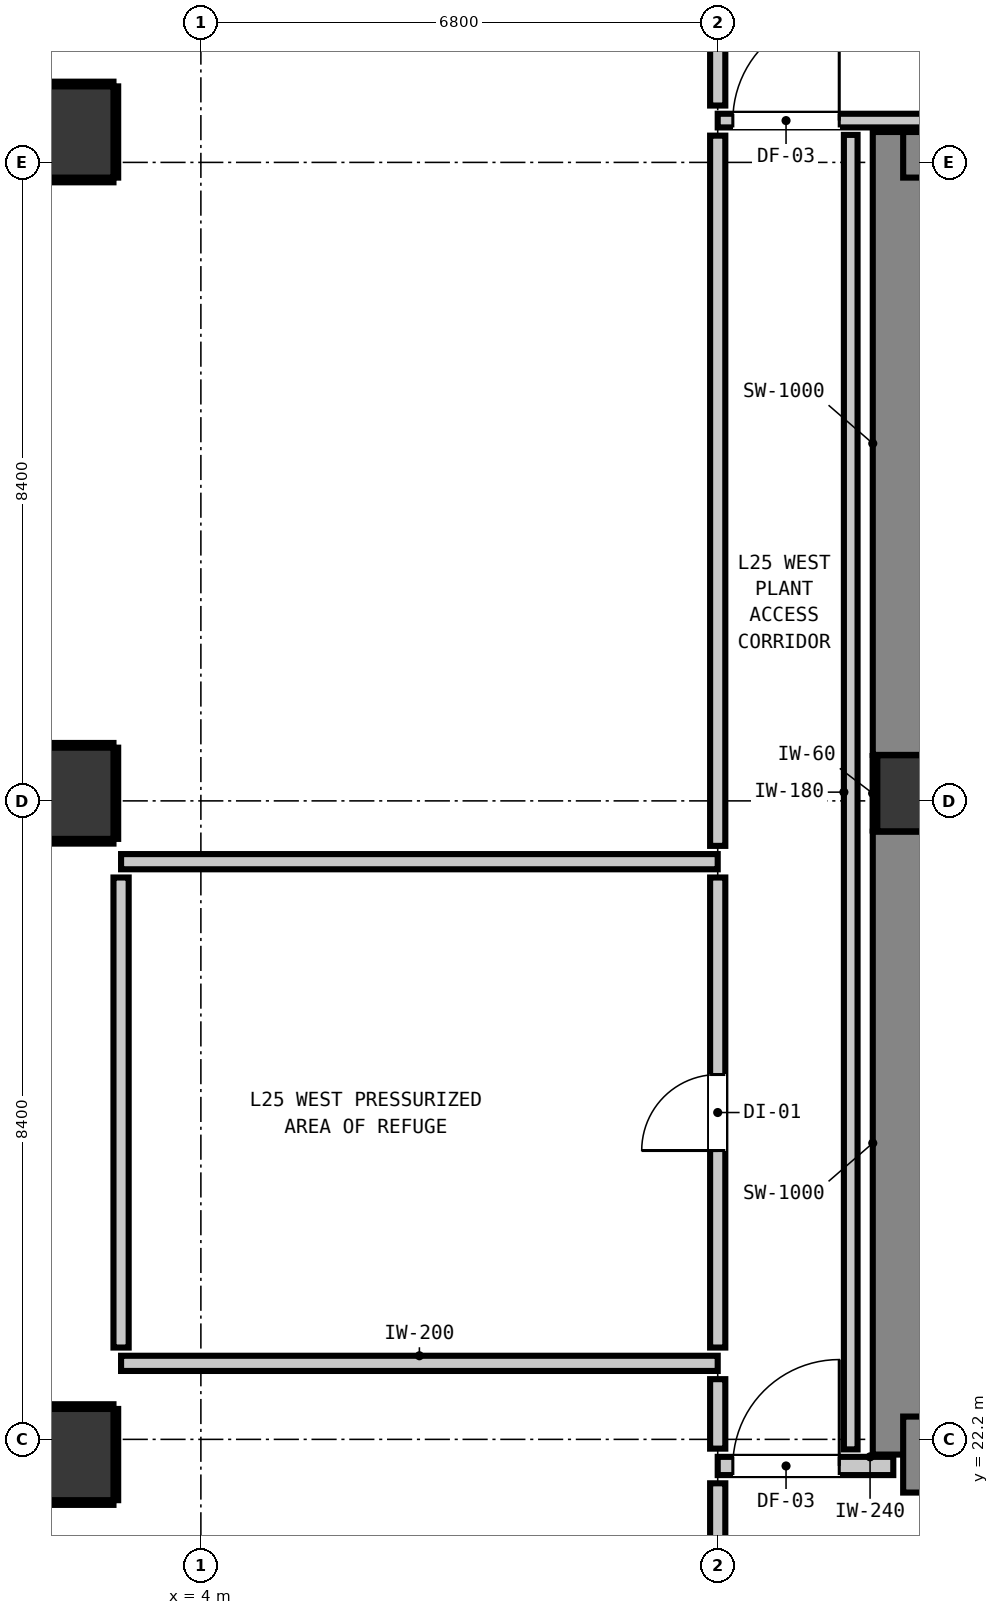
"""IFC4 building model, lengths in metres.
Left out: names, types, materials, properties, quantities, classifications, styles, units other than length and angle.
Written with IfcOpenShell. Run it as: python <this file> out.ifc"""

import sys

from ifc_helpers import new_model, si_unit, direction, frame, frame_2d, origin, origin_2d, place, context, subcontext, project, spatial, rectangle, extrude, element, fill, save


model = new_model("IFC4")
c1 = context("Model", 3, precision=1e-05, world=origin(), true_north=direction((0.0, 1.0)))
c2 = subcontext(c1, "Body", "Model", "MODEL_VIEW")
j1 = project(units=[si_unit("LENGTHUNIT", "METRE"), si_unit("PLANEANGLEUNIT", "RADIAN")], contexts=[c1])
p1 = place(None, origin())
s1 = spatial("IfcSite", under=j1, at=p1, CompositionType="ELEMENT")
p2 = place(p1, origin())
s2 = spatial("IfcBuilding", under=s1, at=p2, CompositionType="ELEMENT")
p3 = place(p2, frame((0.0, 0.0, 88.4)))
s3 = spatial("IfcBuildingStorey", under=s2, at=p3, CompositionType="ELEMENT", Elevation=88.4)
p4 = place(p3, frame((13.4, 30.7, 0.0), z_axis=(0.0, 0.0, 1.0), x_axis=(1.0, 0.0, 0.0)))
e1 = element("IfcColumn", 1, at=p4, inside=s3, PredefinedType="COLUMN", context=c2, shape_type="SweptSolid", body=[
    extrude(rectangle(XDim=1.0, YDim=1.0, at=origin_2d()), origin(), (0.0, 0.0, 1.0), 4.4),
])
p5 = place(p3, frame((13.34, 22.0, 0.0), z_axis=(0.0, 0.0, 1.0), x_axis=(0.0, 1.0, 0.0)))
e2 = element("IfcWall", 2, at=p5, inside=s3, PredefinedType="SHEAR", context=c2, shape_type="SweptSolid", body=[
    extrude(rectangle(XDim=8.195, YDim=1.0, at=frame_2d((4.098, 0.0))), origin(), (0.0, 0.0, 1.0), 4.4),
])
p6 = place(p3, frame((13.34, 31.205, 0.0), z_axis=(0.0, 0.0, 1.0), x_axis=(0.0, 1.0, 0.0)))
e3 = element("IfcWall", 3, at=p6, inside=s3, PredefinedType="SHEAR", context=c2, shape_type="SweptSolid", body=[
    extrude(rectangle(XDim=8.195, YDim=1.0, at=frame_2d((4.097, 0.0))), origin(), (0.0, 0.0, 1.0), 4.4),
])
p7 = place(p3, frame((13.24, 22.0, 0.0), z_axis=(0.0, 0.0, 1.0), x_axis=(1.0, 0.0, 0.0)))
e4 = element("IfcWall", 4, at=p7, inside=s3, PredefinedType="SHEAR", context=c2, shape_type="SweptSolid", body=[
    extrude(rectangle(XDim=4.08, YDim=1.0, at=frame_2d((2.04, 0.0))), origin(), (0.0, 0.0, 1.0), 4.4),
])
p8 = place(p3, frame((13.24, 39.1, 0.0), z_axis=(0.0, 0.0, 1.0), x_axis=(1.0, 0.0, 0.0)))
e5 = element("IfcWall", 5, at=p8, inside=s3, PredefinedType="SHEAR", context=c2, shape_type="SweptSolid", body=[
    extrude(rectangle(XDim=4.08, YDim=0.6, at=frame_2d((2.04, 0.0))), origin(), (0.0, 0.0, 1.0), 4.4),
])
for number, where, z_axis, x_axis in (
    (6, (2.25, 22.0, 0.0), (0.0, 0.0, 1.0), (1.0, 0.0, 0.0)),
    (7, (2.25, 30.7, 0.0), (0.0, 0.0, 1.0), (1.0, 0.0, 0.0)),
    (8, (2.25, 39.4, 0.0), (0.0, 0.0, 1.0), (1.0, 0.0, 0.0)),
):
    element("IfcColumn", number, at=place(p3, frame(where, z_axis=z_axis, x_axis=x_axis)), inside=s3, PredefinedType="COLUMN", context=c2, shape_type="SweptSolid", body=[
        extrude(rectangle(XDim=1.2, YDim=1.2, at=origin_2d()), origin(), (0.0, 0.0, 1.0), 4.4),
    ])
p9 = place(p3, frame((10.8, 21.85, 0.0), z_axis=(0.0, 0.0, 1.0), x_axis=(1.0, 0.0, 0.0)))
e9 = element("IfcWall", 9, at=p9, inside=s3, PredefinedType="PARTITIONING", context=c2, shape_type="SweptSolid", body=[
    extrude(rectangle(XDim=2.31, YDim=0.24, at=frame_2d((1.155, 0.0))), origin(), (0.0, 0.0, 1.0), 3.878),
])
p10 = place(p9, frame((0.199, 0.0, 0.0)))
e10 = element("IfcOpeningElement", 10, at=p10, cuts=e9, PredefinedType="OPENING", context=c2, shape_type="SweptSolid", body=[
    extrude(rectangle(XDim=1.4, YDim=2.15, at=frame_2d((0.7, 1.075))), frame((0.0, 0.13, 0.0), z_axis=(0.0, -1.0, 0.0), x_axis=(1.0, 0.0, 0.0)), (0.0, 0.0, 1.0), 0.26),
])
for number, where, z_axis, x_axis in (
    (11, (2.95, 23.2, 0.0), (0.0, 0.0, 1.0), (1.0, 0.0, 0.0)),
    (12, (2.95, 29.8, 0.0), (0.0, 0.0, 1.0), (1.0, 0.0, 0.0)),
):
    element("IfcWall", number, at=place(p3, frame(where, z_axis=z_axis, x_axis=x_axis)), inside=s3, PredefinedType="PARTITIONING", context=c2, shape_type="SweptSolid", body=[
        extrude(rectangle(XDim=7.85, YDim=0.2, at=frame_2d((3.925, 0.0))), origin(), (0.0, 0.0, 1.0), 4.14),
    ])
p11 = place(p3, frame((10.8, 39.55, 0.0), z_axis=(0.0, 0.0, 1.0), x_axis=(1.0, 0.0, 0.0)))
e13 = element("IfcWall", 13, at=p11, inside=s3, PredefinedType="PARTITIONING", context=c2, shape_type="SweptSolid", body=[
    extrude(rectangle(XDim=9.398, YDim=0.18, at=frame_2d((4.699, 0.0))), origin(), (0.0, 0.0, 1.0), 3.878),
])
p12 = place(p11, frame((6.635, 0.0, 0.0)))
e14 = element("IfcOpeningElement", 14, at=p12, cuts=e13, PredefinedType="OPENING", context=c2, shape_type="SweptSolid", body=[
    extrude(rectangle(XDim=1.4, YDim=2.15, at=frame_2d((0.7, 1.075))), frame((0.0, 0.1, 0.0), z_axis=(0.0, -1.0, 0.0), x_axis=(1.0, 0.0, 0.0)), (0.0, 0.0, 1.0), 0.2),
])
p13 = place(p11, frame((0.199, 0.0, 0.0)))
e15 = element("IfcOpeningElement", 15, at=p13, cuts=e13, PredefinedType="OPENING", context=c2, shape_type="SweptSolid", body=[
    extrude(rectangle(XDim=1.4, YDim=2.15, at=frame_2d((0.7, 1.075))), frame((0.0, 0.1, 0.0), z_axis=(0.0, -1.0, 0.0), x_axis=(1.0, 0.0, 0.0)), (0.0, 0.0, 1.0), 0.2),
])
p14 = place(p3, frame((2.95, 23.408, 0.0), z_axis=(0.0, 0.0, 1.0), x_axis=(0.0, 1.0, 0.0)))
e16 = element("IfcWall", 16, at=p14, inside=s3, PredefinedType="PARTITIONING", context=c2, shape_type="SweptSolid", body=[
    extrude(rectangle(XDim=6.184, YDim=0.2, at=frame_2d((3.092, 0.0))), origin(), (0.0, 0.0, 1.0), 4.14),
])
p15 = place(p3, frame((10.8, 20.308, 0.0), z_axis=(0.0, 0.0, 1.0), x_axis=(0.0, 1.0, 0.0)))
e17 = element("IfcWall", 17, at=p15, inside=s3, PredefinedType="PARTITIONING", context=c2, shape_type="SweptSolid", body=[
    extrude(rectangle(XDim=1.314, YDim=0.2, at=frame_2d((0.657, 0.0))), origin(), (0.0, 0.0, 1.0), 4.14),
])
p16 = place(p3, frame((10.8, 22.078, 0.0), z_axis=(0.0, 0.0, 1.0), x_axis=(0.0, 1.0, 0.0)))
e18 = element("IfcWall", 18, at=p16, inside=s3, PredefinedType="PARTITIONING", context=c2, shape_type="SweptSolid", body=[
    extrude(rectangle(XDim=0.914, YDim=0.2, at=frame_2d((0.457, 0.0))), origin(), (0.0, 0.0, 1.0), 4.14),
])
p17 = place(p3, frame((10.8, 23.408, 0.0), z_axis=(0.0, 0.0, 1.0), x_axis=(0.0, 1.0, 0.0)))
e19 = element("IfcWall", 19, at=p17, inside=s3, PredefinedType="PARTITIONING", context=c2, shape_type="SweptSolid", body=[
    extrude(rectangle(XDim=6.184, YDim=0.2, at=frame_2d((3.092, 0.0))), origin(), (0.0, 0.0, 1.0), 4.14),
])
p18 = place(p17, frame((2.592, 0.0, 0.0)))
e20 = element("IfcOpeningElement", 20, at=p18, cuts=e19, PredefinedType="OPENING", context=c2, shape_type="SweptSolid", body=[
    extrude(rectangle(XDim=1.0, YDim=2.15, at=frame_2d((0.5, 1.075))), frame((0.0, 0.11, 0.0), z_axis=(0.0, -1.0, 0.0), x_axis=(1.0, 0.0, 0.0)), (0.0, 0.0, 1.0), 0.22),
])
p19 = place(p3, frame((10.8, 30.008, 0.0), z_axis=(0.0, 0.0, 1.0), x_axis=(0.0, 1.0, 0.0)))
e21 = element("IfcWall", 21, at=p19, inside=s3, PredefinedType="PARTITIONING", context=c2, shape_type="SweptSolid", body=[
    extrude(rectangle(XDim=9.344, YDim=0.2, at=frame_2d((4.672, 0.0))), origin(), (0.0, 0.0, 1.0), 4.14),
])
p20 = place(p3, frame((10.8, 39.748, 0.0), z_axis=(0.0, 0.0, 1.0), x_axis=(0.0, 1.0, 0.0)))
e22 = element("IfcWall", 22, at=p20, inside=s3, PredefinedType="PARTITIONING", context=c2, shape_type="SweptSolid", body=[
    extrude(rectangle(XDim=1.344, YDim=0.2, at=frame_2d((0.672, 0.0))), origin(), (0.0, 0.0, 1.0), 4.14),
])
p21 = place(p3, frame((12.55, 22.068, 0.0), z_axis=(0.0, 0.0, 1.0), x_axis=(0.0, 1.0, 0.0)))
e23 = element("IfcWall", 23, at=p21, inside=s3, PredefinedType="PARTITIONING", context=c2, shape_type="SweptSolid", body=[
    extrude(rectangle(XDim=17.294, YDim=0.18, at=frame_2d((8.647, 0.0))), origin(), (0.0, 0.0, 1.0), 4.14),
])
p22 = place(p3, frame((12.868, 30.21, 0.0), z_axis=(0.0, 0.0, 1.0), x_axis=(0.0, 1.0, 0.0)))
e24 = element("IfcWall", 24, at=p22, inside=s3, PredefinedType="PARTITIONING", context=c2, shape_type="SweptSolid", body=[
    extrude(rectangle(XDim=0.98, YDim=0.06, at=frame_2d((0.49, 0.0))), origin(), (0.0, 0.0, 1.0), 1.45),
])
for number, where, z_axis, x_axis in (
    (25, (1.83, 21.368, 0.0), (0.0, 0.0, 1.0), (1.0, 0.0, 0.0)),
    (26, (1.83, 22.632, 0.0), (0.0, 0.0, 1.0), (1.0, 0.0, 0.0)),
):
    element("IfcWall", number, at=place(p3, frame(where, z_axis=z_axis, x_axis=x_axis)), inside=s3, PredefinedType="PARTITIONING", context=c2, shape_type="SweptSolid", body=[
        extrude(rectangle(XDim=1.02, YDim=0.06, at=frame_2d((0.51, 0.0))), origin(), (0.0, 0.0, 1.0), 1.45),
    ])
p23 = place(p3, frame((2.882, 21.4, 0.0), z_axis=(0.0, 0.0, 1.0), x_axis=(0.0, 1.0, 0.0)))
e27 = element("IfcWall", 27, at=p23, inside=s3, PredefinedType="PARTITIONING", context=c2, shape_type="SweptSolid", body=[
    extrude(rectangle(XDim=1.2, YDim=0.06, at=frame_2d((0.6, 0.0))), origin(), (0.0, 0.0, 1.0), 1.45),
])
for number, where, z_axis, x_axis in (
    (28, (1.83, 30.068, 0.0), (0.0, 0.0, 1.0), (1.0, 0.0, 0.0)),
    (29, (1.83, 31.332, 0.0), (0.0, 0.0, 1.0), (1.0, 0.0, 0.0)),
):
    element("IfcWall", number, at=place(p3, frame(where, z_axis=z_axis, x_axis=x_axis)), inside=s3, PredefinedType="PARTITIONING", context=c2, shape_type="SweptSolid", body=[
        extrude(rectangle(XDim=1.02, YDim=0.06, at=frame_2d((0.51, 0.0))), origin(), (0.0, 0.0, 1.0), 1.45),
    ])
p24 = place(p3, frame((2.882, 30.1, 0.0), z_axis=(0.0, 0.0, 1.0), x_axis=(0.0, 1.0, 0.0)))
e30 = element("IfcWall", 30, at=p24, inside=s3, PredefinedType="PARTITIONING", context=c2, shape_type="SweptSolid", body=[
    extrude(rectangle(XDim=1.2, YDim=0.06, at=frame_2d((0.6, 0.0))), origin(), (0.0, 0.0, 1.0), 1.45),
])
for number, where, z_axis, x_axis in (
    (31, (1.83, 38.768, 0.0), (0.0, 0.0, 1.0), (1.0, 0.0, 0.0)),
    (32, (1.83, 40.032, 0.0), (0.0, 0.0, 1.0), (1.0, 0.0, 0.0)),
):
    element("IfcWall", number, at=place(p3, frame(where, z_axis=z_axis, x_axis=x_axis)), inside=s3, PredefinedType="PARTITIONING", context=c2, shape_type="SweptSolid", body=[
        extrude(rectangle(XDim=1.02, YDim=0.06, at=frame_2d((0.51, 0.0))), origin(), (0.0, 0.0, 1.0), 1.45),
    ])
p25 = place(p3, frame((2.882, 38.8, 0.0), z_axis=(0.0, 0.0, 1.0), x_axis=(0.0, 1.0, 0.0)))
e33 = element("IfcWall", 33, at=p25, inside=s3, PredefinedType="PARTITIONING", context=c2, shape_type="SweptSolid", body=[
    extrude(rectangle(XDim=1.2, YDim=0.06, at=frame_2d((0.6, 0.0))), origin(), (0.0, 0.0, 1.0), 1.45),
])
p26 = place(p10, origin())
e34 = element("IfcDoor", 34, at=p26, inside=s3, OperationType="SINGLE_SWING_RIGHT", PredefinedType="DOOR", context=c2, shape_type="SweptSolid", body=[
    extrude(rectangle(XDim=1.4, YDim=2.15, at=frame_2d((0.7, 1.075))), frame((0.0, 0.025, 0.0), z_axis=(0.0, -1.0, 0.0), x_axis=(1.0, 0.0, 0.0)), (0.0, 0.0, 1.0), 0.05),
])
fill(e10, e34)
p27 = place(p13, origin())
e35 = element("IfcDoor", 35, at=p27, inside=s3, OperationType="SINGLE_SWING_RIGHT", PredefinedType="DOOR", context=c2, shape_type="SweptSolid", body=[
    extrude(rectangle(XDim=1.4, YDim=2.15, at=frame_2d((0.7, 1.075))), frame((0.0, 0.025, 0.0), z_axis=(0.0, -1.0, 0.0), x_axis=(1.0, 0.0, 0.0)), (0.0, 0.0, 1.0), 0.05),
])
fill(e15, e35)
p28 = place(p18, origin())
e36 = element("IfcDoor", 36, at=p28, inside=s3, OperationType="SINGLE_SWING_LEFT", PredefinedType="DOOR", context=c2, shape_type="SweptSolid", body=[
    extrude(rectangle(XDim=1.0, YDim=2.15, at=frame_2d((0.5, 1.075))), frame((0.0, 0.025, 0.0), z_axis=(0.0, -1.0, 0.0), x_axis=(1.0, 0.0, 0.0)), (0.0, 0.0, 1.0), 0.05),
])
fill(e20, e36)
save(model, sys.argv[1])
